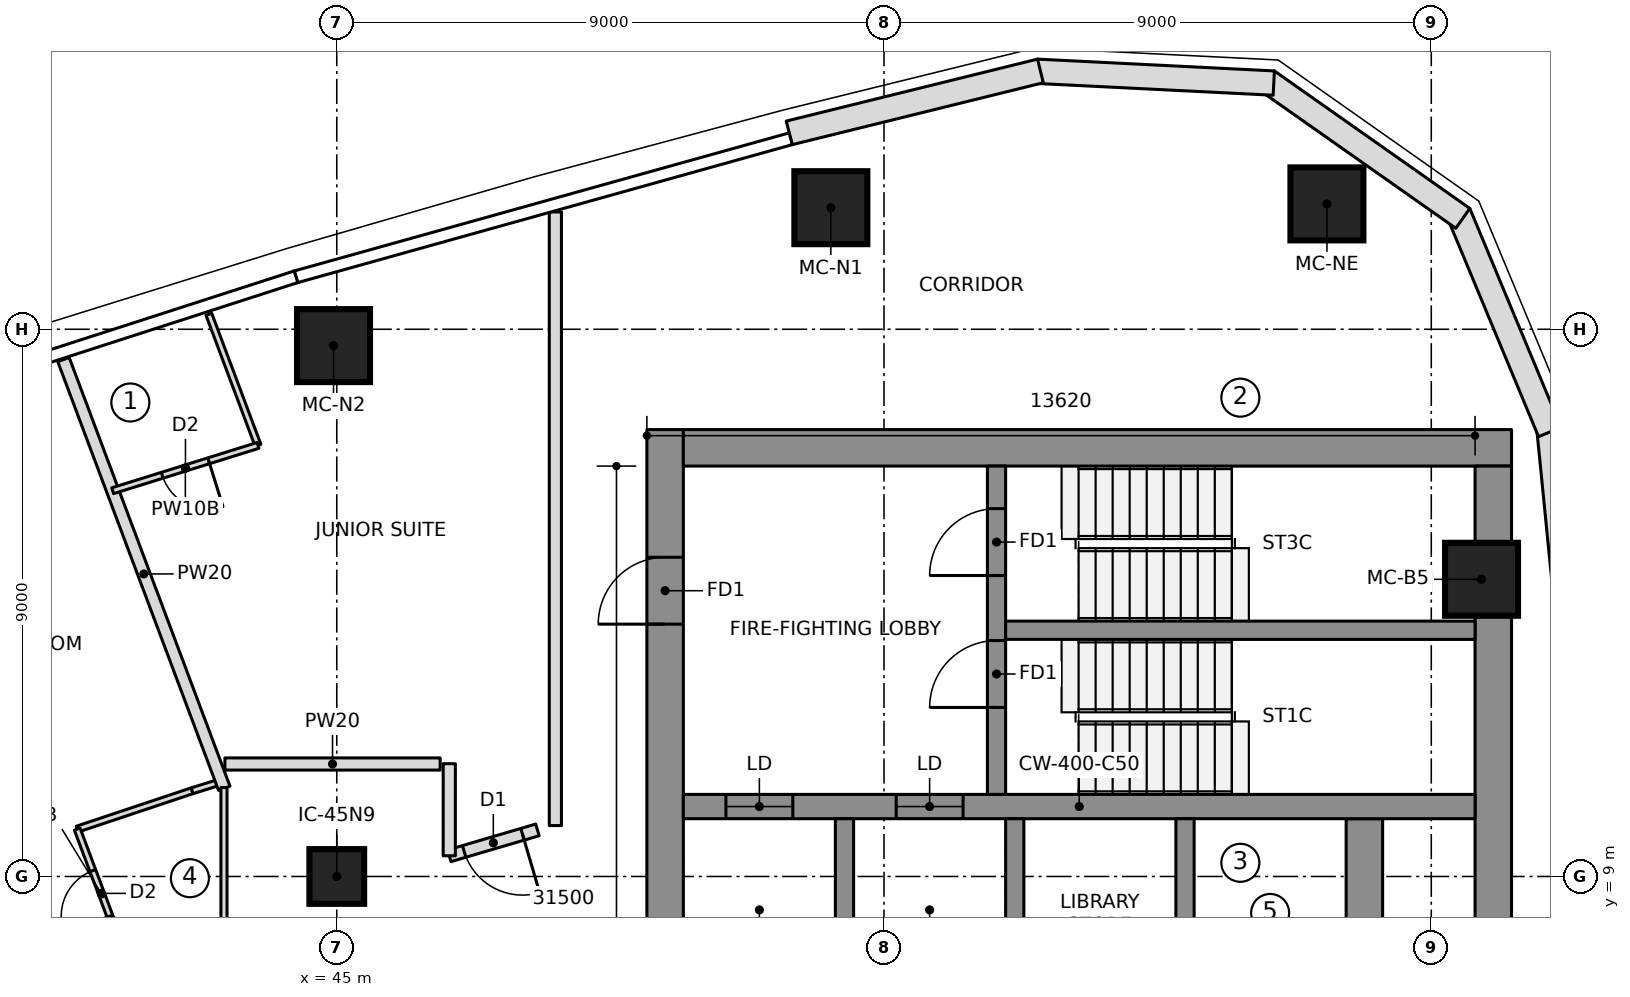
"""IFC4 building model, lengths in metres.
Left out: names, types, materials, properties, quantities, classifications, styles, units other than length and angle.
Written with IfcOpenShell. Run it as: python <this file> out.ifc"""

import sys

from ifc_helpers import new_model, si_unit, direction, frame, frame_2d, origin, origin_2d, place, context, subcontext, project, spatial, polyline, rectangle, outline, extrude, element, fill, save


model = new_model("IFC4")
c1 = context("Model", 3, precision=1e-05, world=origin(), true_north=direction((0.0, 1.0)))
c2 = subcontext(c1, "Body", "Model", "MODEL_VIEW")
j1 = project(units=[si_unit("LENGTHUNIT", "METRE"), si_unit("PLANEANGLEUNIT", "RADIAN")], contexts=[c1])
p1 = place(None, origin())
s1 = spatial("IfcSite", under=j1, at=p1, CompositionType="ELEMENT")
p2 = place(p1, origin())
s2 = spatial("IfcBuilding", under=s1, at=p2, CompositionType="ELEMENT")
p3 = place(p2, frame((0.0, 0.0, 249.2)))
s3 = spatial("IfcBuildingStorey", under=s2, at=p3, CompositionType="ELEMENT", Elevation=249.2)
p4 = place(p3, frame((50.4, 6.65, 0.0), z_axis=(0.0, 0.0, 1.0), x_axis=(0.0, 1.0, 0.0)))
e1 = element("IfcWall", 1, at=p4, inside=s3, PredefinedType="SHEAR", context=c2, shape_type="SweptSolid", body=[
    extrude(rectangle(XDim=9.7, YDim=0.6, at=frame_2d((4.85, 0.0))), origin(), (0.0, 0.0, 1.0), 3.55),
])
p5 = place(p4, frame((6.5, 0.0, 0.0)))
e2 = element("IfcOpeningElement", 2, at=p5, cuts=e1, PredefinedType="OPENING", context=c2, shape_type="SweptSolid", body=[
    extrude(rectangle(XDim=1.1, YDim=2.1, at=frame_2d((0.55, 1.05))), frame((0.0, 0.31, 0.0), z_axis=(0.0, -1.0, 0.0), x_axis=(1.0, 0.0, 0.0)), (0.0, 0.0, 1.0), 0.62),
])
p6 = place(p3, frame((50.7, 16.05, 0.0), z_axis=(0.0, 0.0, 1.0), x_axis=(1.0, 0.0, 0.0)))
e3 = element("IfcWall", 3, at=p6, inside=s3, PredefinedType="SHEAR", context=c2, shape_type="SweptSolid", body=[
    extrude(rectangle(XDim=13.62, YDim=0.6, at=frame_2d((6.81, 0.0))), origin(), (0.0, 0.0, 1.0), 3.55),
])
p7 = place(p3, frame((64.02, 7.502, 0.0), z_axis=(0.0, 0.0, 1.0), x_axis=(0.0, 1.0, 0.0)))
e4 = element("IfcWall", 4, at=p7, inside=s3, PredefinedType="SHEAR", context=c2, shape_type="SweptSolid", body=[
    extrude(rectangle(XDim=8.248, YDim=0.6, at=frame_2d((4.124, 0.0))), origin(), (0.0, 0.0, 1.0), 3.55),
])
p8 = place(p3, frame((61.9, -9.95, 0.0), z_axis=(0.0, 0.0, 1.0), x_axis=(0.0, 1.0, 0.0)))
e5 = element("IfcWall", 5, at=p8, inside=s3, PredefinedType="SHEAR", context=c2, shape_type="SweptSolid", body=[
    extrude(rectangle(XDim=19.9, YDim=0.6, at=frame_2d((9.95, 0.0))), origin(), (0.0, 0.0, 1.0), 3.55),
])
p9 = place(p3, frame((50.7, 10.15, 0.0), z_axis=(0.0, 0.0, 1.0), x_axis=(1.0, 0.0, 0.0)))
e6 = element("IfcWall", 6, at=p9, inside=s3, PredefinedType="SHEAR", context=c2, shape_type="SweptSolid", body=[
    extrude(rectangle(XDim=13.02, YDim=0.4, at=frame_2d((6.51, 0.0))), origin(), (0.0, 0.0, 1.0), 3.55),
])
p10 = place(p9, frame((0.7, 0.0, 0.0)))
e7 = element("IfcOpeningElement", 7, at=p10, cuts=e6, PredefinedType="OPENING", context=c2, shape_type="SweptSolid", body=[
    extrude(rectangle(XDim=1.1, YDim=2.1, at=frame_2d((0.55, 1.05))), frame((0.0, 0.21, 0.0), z_axis=(0.0, -1.0, 0.0), x_axis=(1.0, 0.0, 0.0)), (0.0, 0.0, 1.0), 0.42),
])
p11 = place(p9, frame((3.5, 0.0, 0.0)))
e8 = element("IfcOpeningElement", 8, at=p11, cuts=e6, PredefinedType="OPENING", context=c2, shape_type="SweptSolid", body=[
    extrude(rectangle(XDim=1.1, YDim=2.1, at=frame_2d((0.55, 1.05))), frame((0.0, 0.21, 0.0), z_axis=(0.0, -1.0, 0.0), x_axis=(1.0, 0.0, 0.0)), (0.0, 0.0, 1.0), 0.42),
])
for number, where, z_axis, x_axis in (
    (9, (53.35, 6.95, 0.0), (0.0, 0.0, 1.0), (0.0, 1.0, 0.0)),
    (10, (56.15, 6.95, 0.0), (0.0, 0.0, 1.0), (0.0, 1.0, 0.0)),
    (11, (58.95, 6.95, 0.0), (0.0, 0.0, 1.0), (0.0, 1.0, 0.0)),
):
    element("IfcWall", number, at=place(p3, frame(where, z_axis=z_axis, x_axis=x_axis)), inside=s3, PredefinedType="SHEAR", context=c2, shape_type="SweptSolid", body=[
        extrude(rectangle(XDim=3.0, YDim=0.3, at=frame_2d((1.5, 0.0))), origin(), (0.0, 0.0, 1.0), 3.55),
    ])
p12 = place(p3, frame((55.85, 10.35, 0.0), z_axis=(0.0, 0.0, 1.0), x_axis=(0.0, 1.0, 0.0)))
e12 = element("IfcWall", 12, at=p12, inside=s3, PredefinedType="SHEAR", context=c2, shape_type="SweptSolid", body=[
    extrude(rectangle(XDim=5.4, YDim=0.3, at=frame_2d((2.7, 0.0))), origin(), (0.0, 0.0, 1.0), 3.55),
])
p13 = place(p12, frame((1.43, 0.0, 0.0)))
e13 = element("IfcOpeningElement", 13, at=p13, cuts=e12, PredefinedType="OPENING", context=c2, shape_type="SweptSolid", body=[
    extrude(rectangle(XDim=1.1, YDim=2.1, at=frame_2d((0.55, 1.05))), frame((0.0, 0.16, 0.0), z_axis=(0.0, -1.0, 0.0), x_axis=(1.0, 0.0, 0.0)), (0.0, 0.0, 1.0), 0.32),
])
p14 = place(p12, frame((3.6, 0.0, 0.0)))
e14 = element("IfcOpeningElement", 14, at=p14, cuts=e12, PredefinedType="OPENING", context=c2, shape_type="SweptSolid", body=[
    extrude(rectangle(XDim=1.1, YDim=2.1, at=frame_2d((0.55, 1.05))), frame((0.0, 0.16, 0.0), z_axis=(0.0, -1.0, 0.0), x_axis=(1.0, 0.0, 0.0)), (0.0, 0.0, 1.0), 0.32),
])
p15 = place(p3, frame((56.0, 13.05, 0.0), z_axis=(0.0, 0.0, 1.0), x_axis=(1.0, 0.0, 0.0)))
e15 = element("IfcWall", 15, at=p15, inside=s3, PredefinedType="SHEAR", context=c2, shape_type="SweptSolid", body=[
    extrude(rectangle(XDim=7.72, YDim=0.3, at=frame_2d((3.86, 0.0))), origin(), (0.0, 0.0, 1.0), 3.55),
])
for number, where, z_axis, x_axis in (
    (16, (63.826, 13.888, 0.0), (0.0, 0.0, 1.0), (1.0, 0.0, 0.0)),
    (17, (61.284, 20.062, 0.0), (0.0, 0.0, 1.0), (1.0, 0.0, 0.0)),
    (18, (53.125, 20.0, 0.0), (0.0, 0.0, 1.0), (1.0, 0.0, 0.0)),
    (19, (44.947, 17.731, 0.0), (0.0, 0.0, 1.0), (1.0, 0.0, 0.0)),
):
    element("IfcColumn", number, at=place(p3, frame(where, z_axis=z_axis, x_axis=x_axis)), inside=s3, PredefinedType="COLUMN", context=c2, shape_type="SweptSolid", body=[
        extrude(rectangle(XDim=1.2, YDim=1.2, at=origin_2d()), origin(), (0.0, 0.0, 1.0), 3.55),
    ])
p16 = place(p3, frame((45.0, 9.0, 0.0), z_axis=(0.0, 0.0, 1.0), x_axis=(1.0, 0.0, 0.0)))
e20 = element("IfcColumn", 20, at=p16, inside=s3, PredefinedType="COLUMN", context=c2, shape_type="SweptSolid", body=[
    extrude(rectangle(XDim=0.9, YDim=0.9, at=origin_2d()), origin(), (0.0, 0.0, 1.0), 3.55),
])
p17 = place(p3, frame((65.342, 12.264, 0.0), z_axis=(0.0, 0.0, 1.0), x_axis=(-0.098718218066, 0.995115427185, 0.0)))
e21 = element("IfcWall", 21, at=p17, inside=s3, PredefinedType="NOTDEFINED", context=c2, shape_type="SweptSolid", body=[
    extrude(outline(polyline([(-0.003, -0.2), (4.123, -0.2), (4.063, 0.2), (0.003, 0.2), (-0.003, -0.2)])), origin(), (0.0, 0.0, 1.0), 3.25),
])
p18 = place(p3, frame((64.938, 16.337, 0.0), z_axis=(0.0, 0.0, 1.0), x_axis=(-0.3844335483, 0.923152667191, 0.0)))
e22 = element("IfcWall", 22, at=p18, inside=s3, PredefinedType="NOTDEFINED", context=c2, shape_type="SweptSolid", body=[
    extrude(outline(polyline([(-0.03, -0.2), (3.871, -0.2), (3.756, 0.2), (0.03, 0.2), (-0.03, -0.2)])), origin(), (0.0, 0.0, 1.0), 3.25),
])
p19 = place(p3, frame((63.471, 19.858, 0.0), z_axis=(0.0, 0.0, 1.0), x_axis=(-0.817942545532, 0.575299915009, 0.0)))
e23 = element("IfcWall", 23, at=p19, inside=s3, PredefinedType="NOTDEFINED", context=c2, shape_type="SweptSolid", body=[
    extrude(outline(polyline([(-0.058, -0.2), (3.871, -0.2), (3.756, 0.2), (0.058, 0.2), (-0.058, -0.2)])), origin(), (0.0, 0.0, 1.0), 3.25),
])
p20 = place(p3, frame((60.352, 22.052, 0.0), z_axis=(0.0, 0.0, 1.0), x_axis=(-0.998758875872, 0.049806705046, 0.0)))
e24 = element("IfcWall", 24, at=p20, inside=s3, PredefinedType="NOTDEFINED", context=c2, shape_type="SweptSolid", body=[
    extrude(outline(polyline([(-0.058, -0.2), (3.843, -0.2), (3.784, 0.2), (0.058, 0.2), (-0.058, -0.2)])), origin(), (0.0, 0.0, 1.0), 3.25),
])
p21 = place(p3, frame((56.543, 22.242, 0.0), z_axis=(0.0, 0.0, 1.0), x_axis=(-0.970902342456, -0.23947576373, 0.0)))
e25 = element("IfcWall", 25, at=p21, inside=s3, PredefinedType="NOTDEFINED", context=c2, shape_type="SweptSolid", body=[
    extrude(outline(polyline([(-0.029, -0.2), (4.226, -0.2), (4.226, 0.2), (0.029, 0.2), (-0.029, -0.2)])), origin(), (0.0, 0.0, 1.0), 3.25),
])
p22 = place(p3, frame((40.732, 9.779, 0.0), z_axis=(0.0, 0.0, 1.0), x_axis=(0.948499248693, 0.316779379426, 0.0)))
e26 = element("IfcWall", 26, at=p22, inside=s3, PredefinedType="PARTITIONING", context=c2, shape_type="SweptSolid", body=[
    extrude(rectangle(XDim=1.991, YDim=0.1, at=frame_2d((0.996, 0.0))), origin(), (0.0, 0.0, 1.0), 3.25),
])
p23 = place(p3, frame((42.621, 10.409, 0.0), z_axis=(0.0, 0.0, 1.0), x_axis=(0.954624465478, 0.297812239356, 0.0)))
e27 = element("IfcWall", 27, at=p23, inside=s3, PredefinedType="PARTITIONING", context=c2, shape_type="SweptSolid", body=[
    extrude(rectangle(XDim=0.511, YDim=0.1, at=frame_2d((0.255, 0.0))), origin(), (0.0, 0.0, 1.0), 3.25),
])
p24 = place(p3, frame((41.532, 7.645, 0.0), z_axis=(0.0, 0.0, 1.0), x_axis=(-0.351146927505, 0.936320370014, 0.0)))
e28 = element("IfcWall", 28, at=p24, inside=s3, PredefinedType="PARTITIONING", context=c2, shape_type="SweptSolid", body=[
    extrude(rectangle(XDim=2.278, YDim=0.1, at=frame_2d((1.139, 0.0))), origin(), (0.0, 0.0, 1.0), 3.25),
])
p25 = place(p24, frame((0.75, 0.0, 0.0)))
e29 = element("IfcOpeningElement", 29, at=p25, cuts=e28, PredefinedType="OPENING", context=c2, shape_type="SweptSolid", body=[
    extrude(rectangle(XDim=0.8, YDim=2.1, at=frame_2d((0.4, 1.05))), frame((0.0, 0.06, 0.0), z_axis=(0.0, -1.0, 0.0), x_axis=(1.0, 0.0, 0.0)), (0.0, 0.0, 1.0), 0.12),
])
p26 = place(p3, frame((43.15, 10.45, 0.0), z_axis=(0.0, 0.0, 1.0), x_axis=(-0.351119888923, 0.936330509811, 0.0)))
e30 = element("IfcWall", 30, at=p26, inside=s3, PredefinedType="PARTITIONING", context=c2, shape_type="SweptSolid", body=[
    extrude(rectangle(XDim=7.531, YDim=0.2, at=frame_2d((3.766, 0.0))), origin(), (0.0, 0.0, 1.0), 3.25),
])
p27 = place(p3, frame((42.896, 18.247, 0.0), z_axis=(0.0, 0.0, 1.0), x_axis=(0.351111827312, -0.936333532841, 0.0)))
e31 = element("IfcWall", 31, at=p27, inside=s3, PredefinedType="PARTITIONING", context=c2, shape_type="SweptSolid", body=[
    extrude(rectangle(XDim=2.304, YDim=0.1, at=frame_2d((1.152, 0.0))), origin(), (0.0, 0.0, 1.0), 3.25),
])
p28 = place(p3, frame((43.705, 16.09, 0.0), z_axis=(0.0, 0.0, 1.0), x_axis=(-0.954665433195, -0.297680887299, 0.0)))
e32 = element("IfcWall", 32, at=p28, inside=s3, PredefinedType="PARTITIONING", context=c2, shape_type="SweptSolid", body=[
    extrude(rectangle(XDim=2.504, YDim=0.1, at=frame_2d((1.252, 0.0))), origin(), (0.0, 0.0, 1.0), 3.25),
])
p29 = place(p28, frame((0.85, 0.0, 0.0)))
e33 = element("IfcOpeningElement", 33, at=p29, cuts=e32, PredefinedType="OPENING", context=c2, shape_type="SweptSolid", body=[
    extrude(rectangle(XDim=0.8, YDim=2.1, at=frame_2d((0.4, 1.05))), frame((0.0, 0.06, 0.0), z_axis=(0.0, -1.0, 0.0), x_axis=(1.0, 0.0, 0.0)), (0.0, 0.0, 1.0), 0.12),
])
p30 = place(p3, frame((43.145, 10.463, 0.0), z_axis=(0.0, 0.0, 1.0), x_axis=(0.0, -1.0, 0.0)))
e34 = element("IfcWall", 34, at=p30, inside=s3, PredefinedType="PARTITIONING", context=c2, shape_type="SweptSolid", body=[
    extrude(rectangle(XDim=2.298, YDim=0.1, at=frame_2d((1.149, 0.0))), origin(), (0.0, 0.0, 1.0), 3.25),
])
p31 = place(p3, frame((48.3, 9.766, 0.0), z_axis=(0.0, 0.0, 1.0), x_axis=(-0.95944263903, -0.281903924079, 0.0)))
e35 = element("IfcWall", 35, at=p31, inside=s3, PredefinedType="PARTITIONING", context=c2, shape_type="SweptSolid", body=[
    extrude(rectangle(XDim=1.511, YDim=0.2, at=frame_2d((0.756, 0.0))), origin(), (0.0, 0.0, 1.0), 3.25),
])
p32 = place(p31, frame((0.256, 0.0, 0.0)))
e36 = element("IfcOpeningElement", 36, at=p32, cuts=e35, PredefinedType="OPENING", context=c2, shape_type="SweptSolid", body=[
    extrude(rectangle(XDim=1.0, YDim=2.1, at=frame_2d((0.5, 1.05))), frame((0.0, 0.11, 0.0), z_axis=(0.0, -1.0, 0.0), x_axis=(1.0, 0.0, 0.0)), (0.0, 0.0, 1.0), 0.22),
])
p33 = place(p3, frame((48.595, 19.929, 0.0), z_axis=(0.0, 0.0, 1.0), x_axis=(0.0, -1.0, 0.0)))
e37 = element("IfcWall", 37, at=p33, inside=s3, PredefinedType="PARTITIONING", context=c2, shape_type="SweptSolid", body=[
    extrude(rectangle(XDim=10.093, YDim=0.2, at=frame_2d((5.046, 0.0))), origin(), (0.0, 0.0, 1.0), 3.25),
])
p34 = place(p3, frame((46.85, 9.34, 0.0), z_axis=(0.0, 0.0, 1.0), x_axis=(0.000322320692, 0.999999948055, 0.0)))
e38 = element("IfcWall", 38, at=p34, inside=s3, PredefinedType="PARTITIONING", context=c2, shape_type="SweptSolid", body=[
    extrude(rectangle(XDim=1.515, YDim=0.2, at=frame_2d((0.757, 0.0))), origin(), (0.0, 0.0, 1.0), 3.25),
])
p35 = place(p3, frame((43.16, 10.85, 0.0), z_axis=(0.0, 0.0, 1.0), x_axis=(1.0, 0.0, 0.0)))
e39 = element("IfcWall", 39, at=p35, inside=s3, PredefinedType="PARTITIONING", context=c2, shape_type="SweptSolid", body=[
    extrude(rectangle(XDim=3.54, YDim=0.2, at=frame_2d((1.77, 0.0))), origin(), (0.0, 0.0, 1.0), 3.25),
])
p36 = place(p25, origin())
e40 = element("IfcDoor", 40, at=p36, inside=s3, OperationType="SINGLE_SWING_LEFT", PredefinedType="DOOR", context=c2, shape_type="SweptSolid", body=[
    extrude(rectangle(XDim=0.8, YDim=2.1, at=frame_2d((0.4, 1.05))), frame((0.0, 0.025, 0.0), z_axis=(0.0, -1.0, 0.0), x_axis=(1.0, 0.0, 0.0)), (0.0, 0.0, 1.0), 0.05),
])
fill(e29, e40)
p37 = place(p29, origin())
e41 = element("IfcDoor", 41, at=p37, inside=s3, OperationType="SINGLE_SWING_LEFT", PredefinedType="DOOR", context=c2, shape_type="SweptSolid", body=[
    extrude(rectangle(XDim=0.8, YDim=2.1, at=frame_2d((0.4, 1.05))), frame((0.0, 0.025, 0.0), z_axis=(0.0, -1.0, 0.0), x_axis=(1.0, 0.0, 0.0)), (0.0, 0.0, 1.0), 0.05),
])
fill(e33, e41)
p38 = place(p32, origin())
e42 = element("IfcDoor", 42, at=p38, inside=s3, OperationType="SINGLE_SWING_LEFT", PredefinedType="DOOR", context=c2, shape_type="SweptSolid", body=[
    extrude(rectangle(XDim=1.0, YDim=2.1, at=frame_2d((0.5, 1.05))), frame((0.0, 0.025, 0.0), z_axis=(0.0, -1.0, 0.0), x_axis=(1.0, 0.0, 0.0)), (0.0, 0.0, 1.0), 0.05),
])
fill(e36, e42)
p39 = place(p10, origin())
e43 = element("IfcDoor", 43, at=p39, inside=s3, OperationType="DOUBLE_DOOR_SLIDING", PredefinedType="DOOR", context=c2, shape_type="SweptSolid", body=[
    extrude(rectangle(XDim=1.1, YDim=2.1, at=frame_2d((0.55, 1.05))), frame((0.0, 0.025, 0.0), z_axis=(0.0, -1.0, 0.0), x_axis=(1.0, 0.0, 0.0)), (0.0, 0.0, 1.0), 0.05),
])
fill(e7, e43)
p40 = place(p11, origin())
e44 = element("IfcDoor", 44, at=p40, inside=s3, OperationType="DOUBLE_DOOR_SLIDING", PredefinedType="DOOR", context=c2, shape_type="SweptSolid", body=[
    extrude(rectangle(XDim=1.1, YDim=2.1, at=frame_2d((0.55, 1.05))), frame((0.0, 0.025, 0.0), z_axis=(0.0, -1.0, 0.0), x_axis=(1.0, 0.0, 0.0)), (0.0, 0.0, 1.0), 0.05),
])
fill(e8, e44)
p41 = place(p13, origin())
e45 = element("IfcDoor", 45, at=p41, inside=s3, OperationType="SINGLE_SWING_RIGHT", PredefinedType="DOOR", context=c2, shape_type="SweptSolid", body=[
    extrude(rectangle(XDim=1.1, YDim=2.1, at=frame_2d((0.55, 1.05))), frame((0.0, 0.025, 0.0), z_axis=(0.0, -1.0, 0.0), x_axis=(1.0, 0.0, 0.0)), (0.0, 0.0, 1.0), 0.05),
])
fill(e13, e45)
p42 = place(p14, origin())
e46 = element("IfcDoor", 46, at=p42, inside=s3, OperationType="SINGLE_SWING_RIGHT", PredefinedType="DOOR", context=c2, shape_type="SweptSolid", body=[
    extrude(rectangle(XDim=1.1, YDim=2.1, at=frame_2d((0.55, 1.05))), frame((0.0, 0.025, 0.0), z_axis=(0.0, -1.0, 0.0), x_axis=(1.0, 0.0, 0.0)), (0.0, 0.0, 1.0), 0.05),
])
fill(e14, e46)
p43 = place(p5, origin())
e47 = element("IfcDoor", 47, at=p43, inside=s3, OperationType="SINGLE_SWING_RIGHT", PredefinedType="DOOR", context=c2, shape_type="SweptSolid", body=[
    extrude(rectangle(XDim=1.1, YDim=2.1, at=frame_2d((0.55, 1.05))), frame((0.0, 0.025, 0.0), z_axis=(0.0, -1.0, 0.0), x_axis=(1.0, 0.0, 0.0)), (0.0, 0.0, 1.0), 0.05),
])
fill(e2, e47)
save(model, sys.argv[1])
